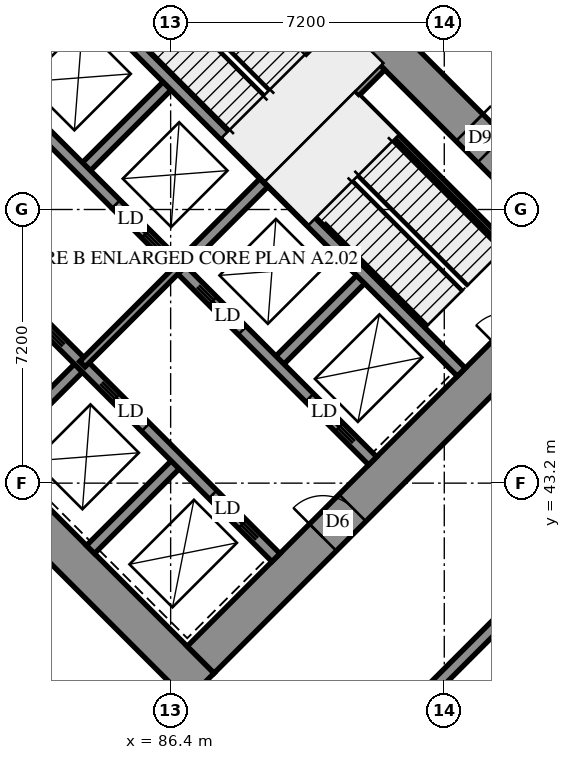
"""IFC4 building model, lengths in metres.
Left out: names, types, materials, properties, quantities, classifications, styles, units other than length and angle.
Written with IfcOpenShell. Run it as: python <this file> out.ifc"""

import sys

from ifc_helpers import new_model, si_unit, direction, frame, frame_2d, origin, place, context, subcontext, project, spatial, polyline, rectangle, outline, extrude, element, fill, save


model = new_model("IFC4")
c1 = context("Model", 3, precision=1e-05, world=origin(), true_north=direction((0.0, 1.0)))
c2 = subcontext(c1, "Body", "Model", "MODEL_VIEW")
j1 = project(units=[si_unit("LENGTHUNIT", "METRE"), si_unit("PLANEANGLEUNIT", "RADIAN")], contexts=[c1])
p1 = place(None, origin())
s1 = spatial("IfcSite", under=j1, at=p1, CompositionType="ELEMENT")
p2 = place(p1, origin())
s2 = spatial("IfcBuilding", under=s1, at=p2, CompositionType="ELEMENT")
p3 = place(p2, origin())
s3 = spatial("IfcBuildingStorey", under=s2, at=p3, CompositionType="ELEMENT", Elevation=0.0)
p4 = place(p3, frame((75.594, 49.443, -0.4), z_axis=(0.0, 0.0, 1.0), x_axis=(0.7071037324, -0.70710983, 0.0)))
e1 = element("IfcWall", 1, at=p4, inside=s3, PredefinedType="SHEAR", context=c2, shape_type="SweptSolid", body=[
    extrude(rectangle(XDim=16.4, YDim=1.0, at=frame_2d((8.2, 0.0))), origin(), (0.0, 0.0, 1.0), 5.3),
])
p5 = place(p3, frame((86.483, 60.333, -0.4), z_axis=(0.0, 0.0, 1.0), x_axis=(0.70710983, -0.7071037324, 0.0)))
e2 = element("IfcWall", 2, at=p5, inside=s3, PredefinedType="SHEAR", context=c2, shape_type="SweptSolid", body=[
    extrude(rectangle(XDim=16.4, YDim=1.0, at=frame_2d((8.2, 0.0))), origin(), (0.0, 0.0, 1.0), 5.3),
])
p6 = place(p5, frame((11.0, 0.0, 0.4)))
e3 = element("IfcOpeningElement", 3, at=p6, cuts=e2, PredefinedType="OPENING", context=c2, shape_type="SweptSolid", body=[
    extrude(rectangle(XDim=0.8, YDim=2.1, at=frame_2d((0.4, 1.05))), frame((0.0, 0.51, 0.0), z_axis=(0.0, -1.0, 0.0), x_axis=(1.0, 0.0, 0.0)), (0.0, 0.0, 1.0), 1.02),
])
p7 = place(p3, frame((76.301, 49.443, -0.4), z_axis=(0.0, 0.0, 1.0), x_axis=(0.7071067812, 0.7071067812, 0.0)))
e4 = element("IfcWall", 4, at=p7, inside=s3, PredefinedType="SHEAR", context=c2, shape_type="SweptSolid", body=[
    extrude(rectangle(XDim=14.4, YDim=1.0, at=frame_2d((7.2, 0.0))), origin(), (0.0, 0.0, 1.0), 5.3),
])
p8 = place(p7, frame((4.55, 0.0, 0.4)))
e5 = element("IfcOpeningElement", 5, at=p8, cuts=e4, PredefinedType="OPENING", context=c2, shape_type="SweptSolid", body=[
    extrude(rectangle(XDim=1.1, YDim=2.1, at=frame_2d((0.55, 1.05))), frame((0.0, 0.51, 0.0), z_axis=(0.0, -1.0, 0.0), x_axis=(1.0, 0.0, 0.0)), (0.0, 0.0, 1.0), 1.02),
])
p9 = place(p7, frame((11.35, 0.0, 0.4)))
e6 = element("IfcOpeningElement", 6, at=p9, cuts=e4, PredefinedType="OPENING", context=c2, shape_type="SweptSolid", body=[
    extrude(rectangle(XDim=1.1, YDim=2.1, at=frame_2d((0.55, 1.05))), frame((0.0, 0.51, 0.0), z_axis=(0.0, -1.0, 0.0), x_axis=(1.0, 0.0, 0.0)), (0.0, 0.0, 1.0), 1.02),
])
p10 = place(p3, frame((87.19, 38.554, -0.4), z_axis=(0.0, 0.0, 1.0), x_axis=(0.707103309, 0.7071102534, 0.0)))
e7 = element("IfcWall", 7, at=p10, inside=s3, PredefinedType="SHEAR", context=c2, shape_type="SweptSolid", body=[
    extrude(rectangle(XDim=14.4, YDim=1.0, at=frame_2d((7.2, 0.0))), origin(), (0.0, 0.0, 1.0), 5.3),
])
p11 = place(p10, frame((4.55, 0.0, 0.4)))
e8 = element("IfcOpeningElement", 8, at=p11, cuts=e7, PredefinedType="OPENING", context=c2, shape_type="SweptSolid", body=[
    extrude(rectangle(XDim=1.1, YDim=2.1, at=frame_2d((0.55, 1.05))), frame((0.0, 0.51, 0.0), z_axis=(0.0, -1.0, 0.0), x_axis=(1.0, 0.0, 0.0)), (0.0, 0.0, 1.0), 1.02),
])
p12 = place(p10, frame((11.35, 0.0, 0.4)))
e9 = element("IfcOpeningElement", 9, at=p12, cuts=e7, PredefinedType="OPENING", context=c2, shape_type="SweptSolid", body=[
    extrude(rectangle(XDim=1.1, YDim=2.1, at=frame_2d((0.55, 1.05))), frame((0.0, 0.51, 0.0), z_axis=(0.0, -1.0, 0.0), x_axis=(1.0, 0.0, 0.0)), (0.0, 0.0, 1.0), 1.02),
])
p13 = place(p3, frame((84.079, 51.423, 0.0), z_axis=(0.0, 0.0, 1.0), x_axis=(0.7071219326, 0.7070916295, 0.0)))
e10 = element("IfcWall", 10, at=p13, inside=s3, PredefinedType="SOLIDWALL", context=c2, shape_type="SweptSolid", body=[
    extrude(rectangle(XDim=3.3, YDim=0.3, at=frame_2d((1.65, 0.0))), origin(), (0.0, 0.0, 1.0), 5.6),
])
p14 = place(p3, frame((81.746, 43.999, 0.0), z_axis=(0.0, 0.0, 1.0), x_axis=(0.7071067812, 0.7071067812, 0.0)))
e11 = element("IfcWall", 11, at=p14, inside=s3, PredefinedType="SOLIDWALL", context=c2, shape_type="SweptSolid", body=[
    extrude(rectangle(XDim=3.3, YDim=0.3, at=frame_2d((1.65, 0.0))), origin(), (0.0, 0.0, 1.0), 5.6),
])
p15 = place(p3, frame((86.625, 48.878, 0.0), z_axis=(0.0, 0.0, 1.0), x_axis=(0.7071067812, 0.7071067812, 0.0)))
e12 = element("IfcWall", 12, at=p15, inside=s3, PredefinedType="SOLIDWALL", context=c2, shape_type="SweptSolid", body=[
    extrude(rectangle(XDim=3.3, YDim=0.3, at=frame_2d((1.65, 0.0))), origin(), (0.0, 0.0, 1.0), 5.6),
])
p16 = place(p3, frame((84.291, 41.453, 0.0), z_axis=(0.0, 0.0, 1.0), x_axis=(0.7071067812, 0.7071067812, 0.0)))
e13 = element("IfcWall", 13, at=p16, inside=s3, PredefinedType="SOLIDWALL", context=c2, shape_type="SweptSolid", body=[
    extrude(rectangle(XDim=3.3, YDim=0.3, at=frame_2d((1.65, 0.0))), origin(), (0.0, 0.0, 1.0), 5.6),
])
p17 = place(p3, frame((89.17, 46.332, 0.0), z_axis=(0.0, 0.0, 1.0), x_axis=(0.7071067812, 0.7071067812, 0.0)))
e14 = element("IfcWall", 14, at=p17, inside=s3, PredefinedType="SOLIDWALL", context=c2, shape_type="SweptSolid", body=[
    extrude(rectangle(XDim=3.3, YDim=0.3, at=frame_2d((1.65, 0.0))), origin(), (0.0, 0.0, 1.0), 5.6),
])
p18 = place(p3, frame((78.988, 51.423, 0.0), z_axis=(0.0, 0.0, 1.0), x_axis=(0.7071067812, -0.7071067812, 0.0)))
e15 = element("IfcWall", 15, at=p18, inside=s3, PredefinedType="SOLIDWALL", context=c2, shape_type="SweptSolid", body=[
    extrude(rectangle(XDim=14.4, YDim=0.3, at=frame_2d((7.2, 0.0))), origin(), (0.0, 0.0, 1.0), 5.6),
])
p19 = place(p18, frame((1.25, 0.0, 0.0)))
e16 = element("IfcOpeningElement", 16, at=p19, cuts=e15, PredefinedType="OPENING", context=c2, shape_type="SweptSolid", body=[
    extrude(rectangle(XDim=1.1, YDim=2.1, at=frame_2d((0.55, 1.05))), frame((0.0, 0.16, 0.0), z_axis=(0.0, -1.0, 0.0), x_axis=(1.0, 0.0, 0.0)), (0.0, 0.0, 1.0), 0.32),
])
p20 = place(p18, frame((4.85, 0.0, 0.0)))
e17 = element("IfcOpeningElement", 17, at=p20, cuts=e15, PredefinedType="OPENING", context=c2, shape_type="SweptSolid", body=[
    extrude(rectangle(XDim=1.1, YDim=2.1, at=frame_2d((0.55, 1.05))), frame((0.0, 0.16, 0.0), z_axis=(0.0, -1.0, 0.0), x_axis=(1.0, 0.0, 0.0)), (0.0, 0.0, 1.0), 0.32),
])
p21 = place(p18, frame((8.45, 0.0, 0.0)))
e18 = element("IfcOpeningElement", 18, at=p21, cuts=e15, PredefinedType="OPENING", context=c2, shape_type="SweptSolid", body=[
    extrude(rectangle(XDim=1.1, YDim=2.1, at=frame_2d((0.55, 1.05))), frame((0.0, 0.16, 0.0), z_axis=(0.0, -1.0, 0.0), x_axis=(1.0, 0.0, 0.0)), (0.0, 0.0, 1.0), 0.32),
])
p22 = place(p18, frame((12.05, 0.0, 0.0)))
e19 = element("IfcOpeningElement", 19, at=p22, cuts=e15, PredefinedType="OPENING", context=c2, shape_type="SweptSolid", body=[
    extrude(rectangle(XDim=1.1, YDim=2.1, at=frame_2d((0.55, 1.05))), frame((0.0, 0.16, 0.0), z_axis=(0.0, -1.0, 0.0), x_axis=(1.0, 0.0, 0.0)), (0.0, 0.0, 1.0), 0.32),
])
p23 = place(p3, frame((81.534, 53.969, 0.0), z_axis=(0.0, 0.0, 1.0), x_axis=(0.707103309, -0.7071102534, 0.0)))
e20 = element("IfcWall", 20, at=p23, inside=s3, PredefinedType="SOLIDWALL", context=c2, shape_type="SweptSolid", body=[
    extrude(rectangle(XDim=14.4, YDim=0.3, at=frame_2d((7.2, 0.0))), origin(), (0.0, 0.0, 1.0), 5.6),
])
p24 = place(p23, frame((1.25, 0.0, 0.0)))
e21 = element("IfcOpeningElement", 21, at=p24, cuts=e20, PredefinedType="OPENING", context=c2, shape_type="SweptSolid", body=[
    extrude(rectangle(XDim=1.1, YDim=2.1, at=frame_2d((0.55, 1.05))), frame((0.0, 0.16, 0.0), z_axis=(0.0, -1.0, 0.0), x_axis=(1.0, 0.0, 0.0)), (0.0, 0.0, 1.0), 0.32),
])
p25 = place(p23, frame((4.85, 0.0, 0.0)))
e22 = element("IfcOpeningElement", 22, at=p25, cuts=e20, PredefinedType="OPENING", context=c2, shape_type="SweptSolid", body=[
    extrude(rectangle(XDim=1.1, YDim=2.1, at=frame_2d((0.55, 1.05))), frame((0.0, 0.16, 0.0), z_axis=(0.0, -1.0, 0.0), x_axis=(1.0, 0.0, 0.0)), (0.0, 0.0, 1.0), 0.32),
])
p26 = place(p23, frame((8.45, 0.0, 0.0)))
e23 = element("IfcOpeningElement", 23, at=p26, cuts=e20, PredefinedType="OPENING", context=c2, shape_type="SweptSolid", body=[
    extrude(rectangle(XDim=1.1, YDim=2.1, at=frame_2d((0.55, 1.05))), frame((0.0, 0.16, 0.0), z_axis=(0.0, -1.0, 0.0), x_axis=(1.0, 0.0, 0.0)), (0.0, 0.0, 1.0), 0.32),
])
p27 = place(p23, frame((12.05, 0.0, 0.0)))
e24 = element("IfcOpeningElement", 24, at=p27, cuts=e20, PredefinedType="OPENING", context=c2, shape_type="SweptSolid", body=[
    extrude(rectangle(XDim=1.1, YDim=2.1, at=frame_2d((0.55, 1.05))), frame((0.0, 0.16, 0.0), z_axis=(0.0, -1.0, 0.0), x_axis=(1.0, 0.0, 0.0)), (0.0, 0.0, 1.0), 0.32),
])
for number, where, z_axis, x_axis in (
    (25, (83.867, 56.302, 0.0), (0.0, 0.0, 1.0), (0.707, -0.707, 0.0)),
    (26, (88.958, 51.211, 0.0), (0.0, 0.0, 1.0), (0.707, -0.707, 0.0)),
):
    element("IfcWall", number, at=place(p3, frame(where, z_axis=z_axis, x_axis=x_axis)), inside=s3, PredefinedType="SOLIDWALL", context=c2, shape_type="SweptSolid", body=[
        extrude(rectangle(XDim=7.2, YDim=0.3, at=frame_2d((3.6, 0.0))), origin(), (0.0, 0.0, 1.0), 5.6),
    ])
p28 = place(p3, frame((88.958, 51.211, 0.0), z_axis=(0.0, 0.0, 1.0), x_axis=(0.7071067812, 0.7071067812, 0.0)))
e27 = element("IfcWall", 27, at=p28, inside=s3, PredefinedType="SOLIDWALL", context=c2, shape_type="SweptSolid", body=[
    extrude(rectangle(XDim=4.2, YDim=0.3, at=frame_2d((2.1, 0.0))), origin(), (0.0, 0.0, 1.0), 5.6),
])
p29 = place(p3, frame((117.843, 34.665, 0.0), z_axis=(0.0, 0.0, 1.0), x_axis=(-0.7071067812, 0.7071067812, 0.0)))
e28 = element("IfcWall", 28, at=p29, inside=s3, PredefinedType="SOLIDWALL", context=c2, shape_type="SweptSolid", body=[
    extrude(outline(polyline([(-0.275, -0.275), (54.222, -0.275), (53.994, 0.275), (0.275, 0.275), (-0.275, -0.275)])), origin(), (0.0, 0.0, 1.0), 5.6),
])
p30 = place(p29, frame((0.8, 0.0, 0.7)))
e29 = element("IfcOpeningElement", 29, at=p30, cuts=e28, PredefinedType="OPENING", context=c2, shape_type="SweptSolid", body=[
    extrude(rectangle(XDim=1.8, YDim=3.4, at=frame_2d((0.9, 1.7))), frame((0.0, 0.285, 0.0), z_axis=(0.0, -1.0, 0.0), x_axis=(1.0, 0.0, 0.0)), (0.0, 0.0, 1.0), 0.57),
])
p31 = place(p29, frame((4.225, 0.0, 0.7)))
e30 = element("IfcOpeningElement", 30, at=p31, cuts=e28, PredefinedType="OPENING", context=c2, shape_type="SweptSolid", body=[
    extrude(rectangle(XDim=1.8, YDim=3.4, at=frame_2d((0.9, 1.7))), frame((0.0, 0.285, 0.0), z_axis=(0.0, -1.0, 0.0), x_axis=(1.0, 0.0, 0.0)), (0.0, 0.0, 1.0), 0.57),
])
p32 = place(p29, frame((7.825, 0.0, 0.7)))
e31 = element("IfcOpeningElement", 31, at=p32, cuts=e28, PredefinedType="OPENING", context=c2, shape_type="SweptSolid", body=[
    extrude(rectangle(XDim=1.8, YDim=3.4, at=frame_2d((0.9, 1.7))), frame((0.0, 0.285, 0.0), z_axis=(0.0, -1.0, 0.0), x_axis=(1.0, 0.0, 0.0)), (0.0, 0.0, 1.0), 0.57),
])
p33 = place(p29, frame((11.425, 0.0, 0.7)))
e32 = element("IfcOpeningElement", 32, at=p33, cuts=e28, PredefinedType="OPENING", context=c2, shape_type="SweptSolid", body=[
    extrude(rectangle(XDim=1.8, YDim=3.4, at=frame_2d((0.9, 1.7))), frame((0.0, 0.285, 0.0), z_axis=(0.0, -1.0, 0.0), x_axis=(1.0, 0.0, 0.0)), (0.0, 0.0, 1.0), 0.57),
])
p34 = place(p29, frame((15.025, 0.0, 0.7)))
e33 = element("IfcOpeningElement", 33, at=p34, cuts=e28, PredefinedType="OPENING", context=c2, shape_type="SweptSolid", body=[
    extrude(rectangle(XDim=1.8, YDim=3.4, at=frame_2d((0.9, 1.7))), frame((0.0, 0.285, 0.0), z_axis=(0.0, -1.0, 0.0), x_axis=(1.0, 0.0, 0.0)), (0.0, 0.0, 1.0), 0.57),
])
p35 = place(p29, frame((22.225, 0.0, 0.7)))
e34 = element("IfcOpeningElement", 34, at=p35, cuts=e28, PredefinedType="OPENING", context=c2, shape_type="SweptSolid", body=[
    extrude(rectangle(XDim=1.8, YDim=3.4, at=frame_2d((0.9, 1.7))), frame((0.0, 0.285, 0.0), z_axis=(0.0, -1.0, 0.0), x_axis=(1.0, 0.0, 0.0)), (0.0, 0.0, 1.0), 0.57),
])
p36 = place(p29, frame((25.825, 0.0, 0.7)))
e35 = element("IfcOpeningElement", 35, at=p36, cuts=e28, PredefinedType="OPENING", context=c2, shape_type="SweptSolid", body=[
    extrude(rectangle(XDim=1.8, YDim=3.4, at=frame_2d((0.9, 1.7))), frame((0.0, 0.285, 0.0), z_axis=(0.0, -1.0, 0.0), x_axis=(1.0, 0.0, 0.0)), (0.0, 0.0, 1.0), 0.57),
])
p37 = place(p29, frame((29.425, 0.0, 0.7)))
e36 = element("IfcOpeningElement", 36, at=p37, cuts=e28, PredefinedType="OPENING", context=c2, shape_type="SweptSolid", body=[
    extrude(rectangle(XDim=1.8, YDim=3.4, at=frame_2d((0.9, 1.7))), frame((0.0, 0.285, 0.0), z_axis=(0.0, -1.0, 0.0), x_axis=(1.0, 0.0, 0.0)), (0.0, 0.0, 1.0), 0.57),
])
p38 = place(p29, frame((33.025, 0.0, 0.7)))
e37 = element("IfcOpeningElement", 37, at=p38, cuts=e28, PredefinedType="OPENING", context=c2, shape_type="SweptSolid", body=[
    extrude(rectangle(XDim=1.8, YDim=3.4, at=frame_2d((0.9, 1.7))), frame((0.0, 0.285, 0.0), z_axis=(0.0, -1.0, 0.0), x_axis=(1.0, 0.0, 0.0)), (0.0, 0.0, 1.0), 0.57),
])
p39 = place(p29, frame((36.625, 0.0, 0.7)))
e38 = element("IfcOpeningElement", 38, at=p39, cuts=e28, PredefinedType="OPENING", context=c2, shape_type="SweptSolid", body=[
    extrude(rectangle(XDim=1.8, YDim=3.4, at=frame_2d((0.9, 1.7))), frame((0.0, 0.285, 0.0), z_axis=(0.0, -1.0, 0.0), x_axis=(1.0, 0.0, 0.0)), (0.0, 0.0, 1.0), 0.57),
])
p40 = place(p29, frame((40.225, 0.0, 0.7)))
e39 = element("IfcOpeningElement", 39, at=p40, cuts=e28, PredefinedType="OPENING", context=c2, shape_type="SweptSolid", body=[
    extrude(rectangle(XDim=1.8, YDim=3.4, at=frame_2d((0.9, 1.7))), frame((0.0, 0.285, 0.0), z_axis=(0.0, -1.0, 0.0), x_axis=(1.0, 0.0, 0.0)), (0.0, 0.0, 1.0), 0.57),
])
p41 = place(p29, frame((47.425, 0.0, 0.7)))
e40 = element("IfcOpeningElement", 40, at=p41, cuts=e28, PredefinedType="OPENING", context=c2, shape_type="SweptSolid", body=[
    extrude(rectangle(XDim=1.8, YDim=3.4, at=frame_2d((0.9, 1.7))), frame((0.0, 0.285, 0.0), z_axis=(0.0, -1.0, 0.0), x_axis=(1.0, 0.0, 0.0)), (0.0, 0.0, 1.0), 0.57),
])
p42 = place(p29, frame((51.06, 0.0, 0.7)))
e41 = element("IfcOpeningElement", 41, at=p42, cuts=e28, PredefinedType="OPENING", context=c2, shape_type="SweptSolid", body=[
    extrude(rectangle(XDim=1.8, YDim=3.4, at=frame_2d((0.9, 1.7))), frame((0.0, 0.285, 0.0), z_axis=(0.0, -1.0, 0.0), x_axis=(1.0, 0.0, 0.0)), (0.0, 0.0, 1.0), 0.57),
])
p43 = place(p3, frame((77.07, 42.275, 0.0), z_axis=(0.0, 0.0, 1.0), x_axis=(0.7071067812, -0.7071067812, 0.0)))
e42 = element("IfcWall", 42, at=p43, inside=s3, PredefinedType="SOLIDWALL", context=c2, shape_type="SweptSolid", body=[
    extrude(outline(polyline([(0.114, -0.275), (39.288, -0.275), (38.737, 0.275), (-0.114, 0.275), (0.114, -0.275)])), origin(), (0.0, 0.0, 1.0), 5.6),
])
p44 = place(p43, frame((2.837, 0.0, 0.7)))
e43 = element("IfcOpeningElement", 43, at=p44, cuts=e42, PredefinedType="OPENING", context=c2, shape_type="SweptSolid", body=[
    extrude(rectangle(XDim=1.8, YDim=3.4, at=frame_2d((0.9, 1.7))), frame((0.0, 0.285, 0.0), z_axis=(0.0, -1.0, 0.0), x_axis=(1.0, 0.0, 0.0)), (0.0, 0.0, 1.0), 0.57),
])
p45 = place(p43, frame((6.588, 0.0, 0.7)))
e44 = element("IfcOpeningElement", 44, at=p45, cuts=e42, PredefinedType="OPENING", context=c2, shape_type="SweptSolid", body=[
    extrude(rectangle(XDim=1.8, YDim=3.4, at=frame_2d((0.9, 1.7))), frame((0.0, 0.285, 0.0), z_axis=(0.0, -1.0, 0.0), x_axis=(1.0, 0.0, 0.0)), (0.0, 0.0, 1.0), 0.57),
])
p46 = place(p43, frame((10.188, 0.0, 0.7)))
e45 = element("IfcOpeningElement", 45, at=p46, cuts=e42, PredefinedType="OPENING", context=c2, shape_type="SweptSolid", body=[
    extrude(rectangle(XDim=1.8, YDim=3.4, at=frame_2d((0.9, 1.7))), frame((0.0, 0.285, 0.0), z_axis=(0.0, -1.0, 0.0), x_axis=(1.0, 0.0, 0.0)), (0.0, 0.0, 1.0), 0.57),
])
p47 = place(p43, frame((17.387, 0.0, 0.7)))
e46 = element("IfcOpeningElement", 46, at=p47, cuts=e42, PredefinedType="OPENING", context=c2, shape_type="SweptSolid", body=[
    extrude(rectangle(XDim=1.8, YDim=3.4, at=frame_2d((0.9, 1.7))), frame((0.0, 0.285, 0.0), z_axis=(0.0, -1.0, 0.0), x_axis=(1.0, 0.0, 0.0)), (0.0, 0.0, 1.0), 0.57),
])
p48 = place(p43, frame((20.988, 0.0, 0.7)))
e47 = element("IfcOpeningElement", 47, at=p48, cuts=e42, PredefinedType="OPENING", context=c2, shape_type="SweptSolid", body=[
    extrude(rectangle(XDim=1.8, YDim=3.4, at=frame_2d((0.9, 1.7))), frame((0.0, 0.285, 0.0), z_axis=(0.0, -1.0, 0.0), x_axis=(1.0, 0.0, 0.0)), (0.0, 0.0, 1.0), 0.57),
])
p49 = place(p43, frame((24.587, 0.0, 0.7)))
e48 = element("IfcOpeningElement", 48, at=p49, cuts=e42, PredefinedType="OPENING", context=c2, shape_type="SweptSolid", body=[
    extrude(rectangle(XDim=1.8, YDim=3.4, at=frame_2d((0.9, 1.7))), frame((0.0, 0.285, 0.0), z_axis=(0.0, -1.0, 0.0), x_axis=(1.0, 0.0, 0.0)), (0.0, 0.0, 1.0), 0.57),
])
p50 = place(p43, frame((28.188, 0.0, 0.7)))
e49 = element("IfcOpeningElement", 49, at=p50, cuts=e42, PredefinedType="OPENING", context=c2, shape_type="SweptSolid", body=[
    extrude(rectangle(XDim=1.8, YDim=3.4, at=frame_2d((0.9, 1.7))), frame((0.0, 0.285, 0.0), z_axis=(0.0, -1.0, 0.0), x_axis=(1.0, 0.0, 0.0)), (0.0, 0.0, 1.0), 0.57),
])
p51 = place(p43, frame((31.788, 0.0, 0.7)))
e50 = element("IfcOpeningElement", 50, at=p51, cuts=e42, PredefinedType="OPENING", context=c2, shape_type="SweptSolid", body=[
    extrude(rectangle(XDim=1.8, YDim=3.4, at=frame_2d((0.9, 1.7))), frame((0.0, 0.285, 0.0), z_axis=(0.0, -1.0, 0.0), x_axis=(1.0, 0.0, 0.0)), (0.0, 0.0, 1.0), 0.57),
])
p52 = place(p43, frame((35.388, 0.0, 0.7)))
e51 = element("IfcOpeningElement", 51, at=p52, cuts=e42, PredefinedType="OPENING", context=c2, shape_type="SweptSolid", body=[
    extrude(rectangle(XDim=1.8, YDim=3.4, at=frame_2d((0.9, 1.7))), frame((0.0, 0.285, 0.0), z_axis=(0.0, -1.0, 0.0), x_axis=(1.0, 0.0, 0.0)), (0.0, 0.0, 1.0), 0.57),
])
p53 = place(p3, frame((91.313, 53.354, 0.0), z_axis=(0.0, 0.0, 1.0), x_axis=(0.7071067812, -0.7071067812, 0.0)))
e52 = element("IfcWall", 52, at=p53, inside=s3, PredefinedType="PARTITIONING", context=c2, shape_type="SweptSolid", body=[
    extrude(rectangle(XDim=5.65, YDim=0.15, at=frame_2d((2.825, 0.0))), origin(), (0.0, 0.0, 1.0), 5.6),
])
p54 = place(p3, frame((84.079, 46.332, 0.0), z_axis=(0.0, 0.0, 1.0), x_axis=(0.7071067812, 0.7071067812, 0.0)))
e53 = element("IfcWall", 53, at=p54, inside=s3, PredefinedType="PARTITIONING", context=c2, shape_type="SweptSolid", body=[
    extrude(rectangle(XDim=3.6, YDim=0.2, at=frame_2d((1.8, 0.0))), origin(), (0.0, 0.0, 1.0), 5.6),
])
p55 = place(p3, frame((104.055, 48.559, 0.0), z_axis=(0.0, 0.0, 1.0), x_axis=(-0.7071067812, -0.7071067812, 0.0)))
e54 = element("IfcWall", 54, at=p55, inside=s3, PredefinedType="PARTITIONING", context=c2, shape_type="SweptSolid", body=[
    extrude(rectangle(XDim=23.6, YDim=0.3, at=frame_2d((11.8, 0.0))), origin(), (0.0, 0.0, 1.0), 5.6),
])
p56 = place(p55, frame((10.8, 0.0, 0.0)))
e55 = element("IfcOpeningElement", 55, at=p56, cuts=e54, PredefinedType="OPENING", context=c2, shape_type="SweptSolid", body=[
    extrude(rectangle(XDim=1.8, YDim=2.4, at=frame_2d((0.9, 1.2))), frame((0.0, 0.16, 0.0), z_axis=(0.0, -1.0, 0.0), x_axis=(1.0, 0.0, 0.0)), (0.0, 0.0, 1.0), 0.32),
])
p57 = place(p55, frame((18.0, 0.0, 0.0)))
e56 = element("IfcOpeningElement", 56, at=p57, cuts=e54, PredefinedType="OPENING", context=c2, shape_type="SweptSolid", body=[
    extrude(rectangle(XDim=1.8, YDim=2.4, at=frame_2d((0.9, 1.2))), frame((0.0, 0.16, 0.0), z_axis=(0.0, -1.0, 0.0), x_axis=(1.0, 0.0, 0.0)), (0.0, 0.0, 1.0), 0.32),
])
p58 = place(p55, frame((6.6, 0.0, 0.0)))
e57 = element("IfcOpeningElement", 57, at=p58, cuts=e54, PredefinedType="OPENING", context=c2, shape_type="SweptSolid", body=[
    extrude(rectangle(XDim=1.0, YDim=2.1, at=frame_2d((0.5, 1.05))), frame((0.0, 0.16, 0.0), z_axis=(0.0, -1.0, 0.0), x_axis=(1.0, 0.0, 0.0)), (0.0, 0.0, 1.0), 0.32),
])
p59 = place(p6, origin())
e58 = element("IfcDoor", 58, at=p59, inside=s3, OperationType="SINGLE_SWING_RIGHT", PredefinedType="DOOR", context=c2, shape_type="SweptSolid", body=[
    extrude(rectangle(XDim=0.8, YDim=2.1, at=frame_2d((0.4, 1.05))), frame((0.0, -0.44, 0.0), z_axis=(0.0, -1.0, 0.0), x_axis=(1.0, 0.0, 0.0)), (0.0, 0.0, 1.0), 0.05),
])
fill(e3, e58)
p60 = place(p11, origin())
e59 = element("IfcDoor", 59, at=p60, inside=s3, OperationType="DOUBLE_DOOR_SINGLE_SWING", PredefinedType="DOOR", context=c2, shape_type="SweptSolid", body=[
    extrude(rectangle(XDim=1.1, YDim=2.1, at=frame_2d((0.55, 1.05))), frame((0.0, 0.025, 0.0), z_axis=(0.0, -1.0, 0.0), x_axis=(1.0, 0.0, 0.0)), (0.0, 0.0, 1.0), 0.05),
])
fill(e8, e59)
p61 = place(p21, origin())
e60 = element("IfcDoor", 60, at=p61, inside=s3, OperationType="SLIDING_TO_LEFT", PredefinedType="DOOR", context=c2, shape_type="SweptSolid", body=[
    extrude(rectangle(XDim=1.1, YDim=2.1, at=frame_2d((0.55, 1.05))), frame((0.0, 0.025, 0.0), z_axis=(0.0, -1.0, 0.0), x_axis=(1.0, 0.0, 0.0)), (0.0, 0.0, 1.0), 0.05),
])
fill(e18, e60)
p62 = place(p22, origin())
e61 = element("IfcDoor", 61, at=p62, inside=s3, OperationType="SLIDING_TO_RIGHT", PredefinedType="DOOR", context=c2, shape_type="SweptSolid", body=[
    extrude(rectangle(XDim=1.1, YDim=2.1, at=frame_2d((0.55, 1.05))), frame((0.0, 0.025, 0.0), z_axis=(0.0, -1.0, 0.0), x_axis=(1.0, 0.0, 0.0)), (0.0, 0.0, 1.0), 0.05),
])
fill(e19, e61)
p63 = place(p25, origin())
e62 = element("IfcDoor", 62, at=p63, inside=s3, OperationType="SLIDING_TO_RIGHT", PredefinedType="DOOR", context=c2, shape_type="SweptSolid", body=[
    extrude(rectangle(XDim=1.1, YDim=2.1, at=frame_2d((0.55, 1.05))), frame((0.0, 0.025, 0.0), z_axis=(0.0, -1.0, 0.0), x_axis=(1.0, 0.0, 0.0)), (0.0, 0.0, 1.0), 0.05),
])
fill(e22, e62)
p64 = place(p26, origin())
e63 = element("IfcDoor", 63, at=p64, inside=s3, OperationType="SLIDING_TO_LEFT", PredefinedType="DOOR", context=c2, shape_type="SweptSolid", body=[
    extrude(rectangle(XDim=1.1, YDim=2.1, at=frame_2d((0.55, 1.05))), frame((0.0, 0.025, 0.0), z_axis=(0.0, -1.0, 0.0), x_axis=(1.0, 0.0, 0.0)), (0.0, 0.0, 1.0), 0.05),
])
fill(e23, e63)
p65 = place(p27, origin())
e64 = element("IfcDoor", 64, at=p65, inside=s3, OperationType="SLIDING_TO_RIGHT", PredefinedType="DOOR", context=c2, shape_type="SweptSolid", body=[
    extrude(rectangle(XDim=1.1, YDim=2.1, at=frame_2d((0.55, 1.05))), frame((0.0, 0.025, 0.0), z_axis=(0.0, -1.0, 0.0), x_axis=(1.0, 0.0, 0.0)), (0.0, 0.0, 1.0), 0.05),
])
fill(e24, e64)
save(model, sys.argv[1])
